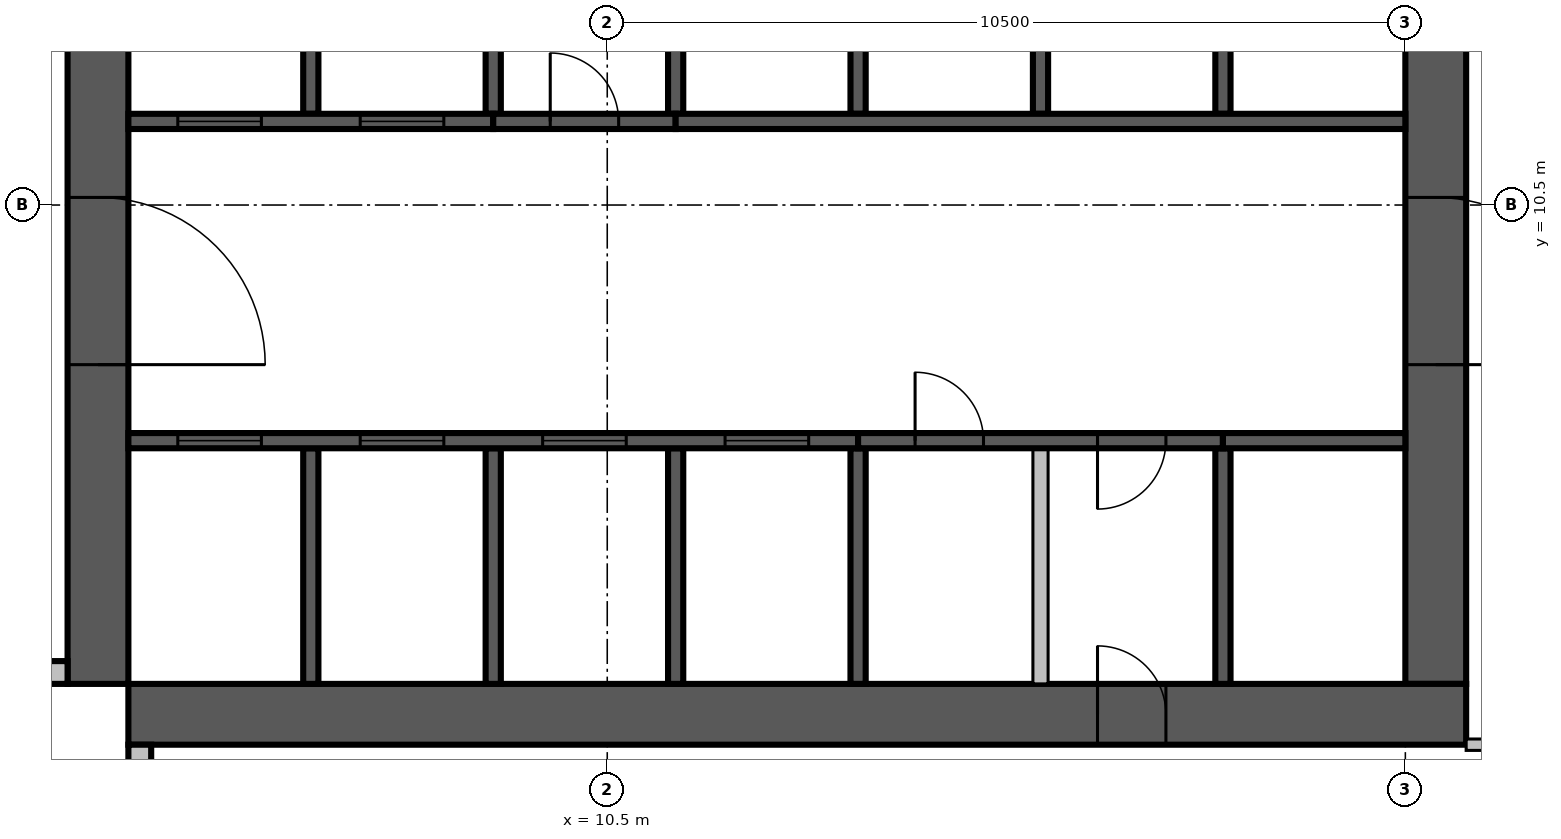
"""IFC4 building model, lengths in metres.
Left out: names, types, materials, properties, quantities, classifications, styles, units other than length and angle.
Written with IfcOpenShell. Run it as: python <this file> out.ifc"""

import sys

from ifc_helpers import new_model, si_unit, direction, frame, frame_2d, origin, place, context, subcontext, project, spatial, rectangle, extrude, source, transform, mapped, element, fill, save


model = new_model("IFC4")
c1 = context("Model", 3, precision=1e-05, world=origin(), true_north=direction((0.0, 1.0)))
c2 = subcontext(c1, "Body", "Model", "MODEL_VIEW")
j1 = project(units=[si_unit("LENGTHUNIT", "METRE"), si_unit("PLANEANGLEUNIT", "RADIAN")], contexts=[c1])
p1 = place(None, origin())
s1 = spatial("IfcSite", under=j1, at=p1, CompositionType="ELEMENT")
p2 = place(p1, origin())
s2 = spatial("IfcBuilding", under=s1, at=p2, CompositionType="ELEMENT")
p3 = place(p2, frame((0.0, 0.0, 265.2)))
s3 = spatial("IfcBuildingStorey", under=s2, at=p3, CompositionType="ELEMENT", Elevation=265.2)
m1 = source(origin(), c2, "Body", "SweptSolid", [
    extrude(rectangle(XDim=17.6, YDim=0.8, at=frame_2d((8.8, 0.0))), origin(), (0.0, 0.0, 1.0), 3.8),
])
p4 = place(p3, frame((3.8, 4.2, 0.0), z_axis=(0.0, 0.0, 1.0), x_axis=(0.0, 1.0, 0.0)))
e1 = element("IfcWall", 1, at=p4, inside=s3, PredefinedType="SHEAR", context=c2, shape_type="MappedRepresentation", body=[
    mapped(m1, transform((0.0, 0.0, 0.0), scale=1.0)),
])
m2 = source(origin(), c2, "Body", "SweptSolid", [
    extrude(rectangle(XDim=2.2, YDim=2.1, at=frame_2d((1.1, 1.05))), frame((0.0, 0.41, 0.0), z_axis=(0.0, -1.0, 0.0), x_axis=(1.0, 0.0, 0.0)), (0.0, 0.0, 1.0), 0.82),
])
p5 = place(p4, frame((4.2, 0.0, 0.0)))
e2 = element("IfcOpeningElement", 2, at=p5, cuts=e1, PredefinedType="OPENING", context=c2, shape_type="MappedRepresentation", body=[
    mapped(m2, transform((0.0, 0.0, 0.0), scale=1.0)),
])
m3 = source(origin(), c2, "Body", "SweptSolid", [
    extrude(rectangle(XDim=0.9, YDim=2.1, at=frame_2d((0.45, 1.05))), frame((0.0, 0.41, 0.0), z_axis=(0.0, -1.0, 0.0), x_axis=(1.0, 0.0, 0.0)), (0.0, 0.0, 1.0), 0.82),
])
p6 = place(p4, frame((10.95, 0.0, 0.0)))
e3 = element("IfcOpeningElement", 3, at=p6, cuts=e1, PredefinedType="OPENING", context=c2, shape_type="MappedRepresentation", body=[
    mapped(m3, transform((0.0, 0.0, 0.0), scale=1.0)),
])
m4 = source(origin(), c2, "Body", "SweptSolid", [
    extrude(rectangle(XDim=16.8, YDim=0.8, at=frame_2d((8.4, 0.0))), origin(), (0.0, 0.0, 1.0), 3.8),
])
p7 = place(p3, frame((21.4, 4.2, 0.0), z_axis=(0.0, 0.0, 1.0), x_axis=(0.0, 1.0, 0.0)))
e4 = element("IfcWall", 4, at=p7, inside=s3, PredefinedType="SHEAR", context=c2, shape_type="MappedRepresentation", body=[
    mapped(m4, transform((0.0, 0.0, 0.0), scale=1.0)),
])
p8 = place(p7, frame((4.2, 0.0, 0.0)))
e5 = element("IfcOpeningElement", 5, at=p8, cuts=e4, PredefinedType="OPENING", context=c2, shape_type="MappedRepresentation", body=[
    mapped(m2, transform((0.0, 0.0, 0.0), scale=1.0)),
])
m5 = source(origin(), c2, "Body", "SweptSolid", [
    extrude(rectangle(XDim=1.2, YDim=2.1, at=frame_2d((0.6, 1.05))), frame((0.0, 0.41, 0.0), z_axis=(0.0, -1.0, 0.0), x_axis=(1.0, 0.0, 0.0)), (0.0, 0.0, 1.0), 0.82),
])
p9 = place(p7, frame((14.7, 0.0, 0.0)))
e6 = element("IfcOpeningElement", 6, at=p9, cuts=e4, PredefinedType="OPENING", context=c2, shape_type="MappedRepresentation", body=[
    mapped(m5, transform((0.0, 0.0, 0.0), scale=1.0)),
])
p10 = place(p3, frame((4.2, 3.8, 0.0), z_axis=(0.0, 0.0, 1.0), x_axis=(1.0, 0.0, 0.0)))
e7 = element("IfcWall", 7, at=p10, inside=s3, PredefinedType="SHEAR", context=c2, shape_type="MappedRepresentation", body=[
    mapped(m1, transform((0.0, 0.0, 0.0), scale=1.0)),
])
p11 = place(p10, frame((12.75, 0.0, 0.0)))
e8 = element("IfcOpeningElement", 8, at=p11, cuts=e7, PredefinedType="OPENING", context=c2, shape_type="MappedRepresentation", body=[
    mapped(m3, transform((0.0, 0.0, 0.0), scale=1.0)),
])
m6 = source(origin(), c2, "Body", "SweptSolid", [
    extrude(rectangle(XDim=3.4, YDim=0.3, at=frame_2d((1.7, 0.0))), origin(), (0.0, 0.0, 1.0), 3.4),
])
p12 = place(p3, frame((0.0, 4.35, 0.0), z_axis=(0.0, 0.0, 1.0), x_axis=(1.0, 0.0, 0.0)))
e9 = element("IfcWall", 9, at=p12, inside=s3, PredefinedType="STANDARD", context=c2, shape_type="MappedRepresentation", body=[
    mapped(m6, transform((0.0, 0.0, 0.0), scale=1.0)),
])
m7 = source(origin(), c2, "Body", "SweptSolid", [
    extrude(rectangle(XDim=1.8, YDim=2.3, at=frame_2d((0.9, 1.15))), frame((0.0, 0.16, 0.0), z_axis=(0.0, -1.0, 0.0), x_axis=(1.0, 0.0, 0.0)), (0.0, 0.0, 1.0), 0.32),
])
p13 = place(p12, frame((1.2, 0.0, 0.6)))
e10 = element("IfcOpeningElement", 10, at=p13, cuts=e9, PredefinedType="OPENING", context=c2, shape_type="MappedRepresentation", body=[
    mapped(m7, transform((0.0, 0.0, 0.0), scale=1.0)),
])
p14 = place(p3, frame((4.35, 3.4, 0.0), z_axis=(0.0, 0.0, 1.0), x_axis=(0.0, -1.0, 0.0)))
e11 = element("IfcWall", 11, at=p14, inside=s3, PredefinedType="STANDARD", context=c2, shape_type="MappedRepresentation", body=[
    mapped(m6, transform((0.0, 0.0, 0.0), scale=1.0)),
])
p15 = place(p14, frame((0.4, 0.0, 0.6)))
e12 = element("IfcOpeningElement", 12, at=p15, cuts=e11, PredefinedType="OPENING", context=c2, shape_type="MappedRepresentation", body=[
    mapped(m7, transform((0.0, 0.0, 0.0), scale=1.0)),
])
m8 = source(origin(), c2, "Body", "SweptSolid", [
    extrude(rectangle(XDim=3.1, YDim=0.2, at=frame_2d((1.55, 0.0))), origin(), (0.0, 0.0, 1.0), 3.8),
])
for number, where, z_axis, x_axis in (
    (13, (6.6, 4.2, 0.0), (0.0, 0.0, 1.0), (0.0, 1.0, 0.0)),
    (14, (9.0, 4.2, 0.0), (0.0, 0.0, 1.0), (0.0, 1.0, 0.0)),
    (15, (11.4, 4.2, 0.0), (0.0, 0.0, 1.0), (0.0, 1.0, 0.0)),
):
    element("IfcWall", number, at=place(p3, frame(where, z_axis=z_axis, x_axis=x_axis)), inside=s3, PredefinedType="SOLIDWALL", context=c2, shape_type="MappedRepresentation", body=[
        mapped(m8, transform((0.0, 0.0, 0.0), scale=1.0)),
    ])
m9 = source(origin(), c2, "Body", "SweptSolid", [
    extrude(rectangle(XDim=3.1, YDim=0.2, at=frame_2d((1.55, 0.0))), origin(), (0.0, 0.0, 1.0), 3.4),
])
for number, where, z_axis, x_axis in (
    (16, (13.8, 4.2, 0.0), (0.0, 0.0, 1.0), (0.0, 1.0, 0.0)),
    (17, (18.6, 4.2, 0.0), (0.0, 0.0, 1.0), (0.0, 1.0, 0.0)),
):
    element("IfcWall", number, at=place(p3, frame(where, z_axis=z_axis, x_axis=x_axis)), inside=s3, PredefinedType="SOLIDWALL", context=c2, shape_type="MappedRepresentation", body=[
        mapped(m9, transform((0.0, 0.0, 0.0), scale=1.0)),
    ])
m10 = source(origin(), c2, "Body", "SweptSolid", [
    extrude(rectangle(XDim=3.1, YDim=0.2, at=frame_2d((1.55, 0.0))), origin(), (0.0, 0.0, 1.0), 3.4),
])
p16 = place(p3, frame((16.2, 4.2, 0.0), z_axis=(0.0, 0.0, 1.0), x_axis=(0.0, 1.0, 0.0)))
e18 = element("IfcWall", 18, at=p16, inside=s3, PredefinedType="PARTITIONING", context=c2, shape_type="MappedRepresentation", body=[
    mapped(m10, transform((0.0, 0.0, 0.0), scale=1.0)),
])
m11 = source(origin(), c2, "Body", "SweptSolid", [
    extrude(rectangle(XDim=3.0, YDim=0.2, at=frame_2d((1.5, 0.0))), origin(), (0.0, 0.0, 1.0), 3.8),
])
p17 = place(p3, frame((6.6, 11.7, 0.0), z_axis=(0.0, 0.0, 1.0), x_axis=(0.0, 1.0, 0.0)))
e19 = element("IfcWall", 19, at=p17, inside=s3, PredefinedType="SOLIDWALL", context=c2, shape_type="MappedRepresentation", body=[
    mapped(m11, transform((0.0, 0.0, 0.0), scale=1.0)),
])
m12 = source(origin(), c2, "Body", "SweptSolid", [
    extrude(rectangle(XDim=3.0, YDim=0.2, at=frame_2d((1.5, 0.0))), origin(), (0.0, 0.0, 1.0), 3.4),
])
for number, where, z_axis, x_axis in (
    (20, (9.0, 11.7, 0.0), (0.0, 0.0, 1.0), (0.0, 1.0, 0.0)),
    (21, (11.4, 11.7, 0.0), (0.0, 0.0, 1.0), (0.0, 1.0, 0.0)),
):
    element("IfcWall", number, at=place(p3, frame(where, z_axis=z_axis, x_axis=x_axis)), inside=s3, PredefinedType="SOLIDWALL", context=c2, shape_type="MappedRepresentation", body=[
        mapped(m12, transform((0.0, 0.0, 0.0), scale=1.0)),
    ])
for number, where, z_axis, x_axis in (
    (22, (13.8, 11.7, 0.0), (0.0, 0.0, 1.0), (0.0, 1.0, 0.0)),
    (23, (16.2, 11.7, 0.0), (0.0, 0.0, 1.0), (0.0, 1.0, 0.0)),
    (24, (18.6, 11.7, 0.0), (0.0, 0.0, 1.0), (0.0, 1.0, 0.0)),
):
    element("IfcWall", number, at=place(p3, frame(where, z_axis=z_axis, x_axis=x_axis)), inside=s3, PredefinedType="SOLIDWALL", context=c2, shape_type="MappedRepresentation", body=[
        mapped(m11, transform((0.0, 0.0, 0.0), scale=1.0)),
    ])
m13 = source(origin(), c2, "Body", "SweptSolid", [
    extrude(rectangle(XDim=9.6, YDim=0.2, at=frame_2d((4.8, 0.0))), origin(), (0.0, 0.0, 1.0), 3.8),
])
p18 = place(p3, frame((4.2, 7.4, 0.0), z_axis=(0.0, 0.0, 1.0), x_axis=(1.0, 0.0, 0.0)))
e25 = element("IfcWall", 25, at=p18, inside=s3, PredefinedType="SOLIDWALL", context=c2, shape_type="MappedRepresentation", body=[
    mapped(m13, transform((0.0, 0.0, 0.0), scale=1.0)),
])
m14 = source(origin(), c2, "Body", "SweptSolid", [
    extrude(rectangle(XDim=1.1, YDim=2.1, at=frame_2d((0.55, 1.05))), frame((0.0, 0.11, 0.0), z_axis=(0.0, -1.0, 0.0), x_axis=(1.0, 0.0, 0.0)), (0.0, 0.0, 1.0), 0.22),
])
p19 = place(p18, frame((0.65, 0.0, 0.0)))
e26 = element("IfcOpeningElement", 26, at=p19, cuts=e25, PredefinedType="OPENING", context=c2, shape_type="MappedRepresentation", body=[
    mapped(m14, transform((0.0, 0.0, 0.0), scale=1.0)),
])
p20 = place(p18, frame((3.05, 0.0, 0.0)))
e27 = element("IfcOpeningElement", 27, at=p20, cuts=e25, PredefinedType="OPENING", context=c2, shape_type="MappedRepresentation", body=[
    mapped(m14, transform((0.0, 0.0, 0.0), scale=1.0)),
])
p21 = place(p18, frame((5.45, 0.0, 0.0)))
e28 = element("IfcOpeningElement", 28, at=p21, cuts=e25, PredefinedType="OPENING", context=c2, shape_type="MappedRepresentation", body=[
    mapped(m14, transform((0.0, 0.0, 0.0), scale=1.0)),
])
p22 = place(p18, frame((7.85, 0.0, 0.0)))
e29 = element("IfcOpeningElement", 29, at=p22, cuts=e25, PredefinedType="OPENING", context=c2, shape_type="MappedRepresentation", body=[
    mapped(m14, transform((0.0, 0.0, 0.0), scale=1.0)),
])
m15 = source(origin(), c2, "Body", "SweptSolid", [
    extrude(rectangle(XDim=4.8, YDim=0.2, at=frame_2d((2.4, 0.0))), origin(), (0.0, 0.0, 1.0), 3.4),
])
p23 = place(p3, frame((13.8, 7.4, 0.0), z_axis=(0.0, 0.0, 1.0), x_axis=(1.0, 0.0, 0.0)))
e30 = element("IfcWall", 30, at=p23, inside=s3, PredefinedType="SOLIDWALL", context=c2, shape_type="MappedRepresentation", body=[
    mapped(m15, transform((0.0, 0.0, 0.0), scale=1.0)),
])
m16 = source(origin(), c2, "Body", "SweptSolid", [
    extrude(rectangle(XDim=0.9, YDim=2.1, at=frame_2d((0.45, 1.05))), frame((0.0, 0.11, 0.0), z_axis=(0.0, -1.0, 0.0), x_axis=(1.0, 0.0, 0.0)), (0.0, 0.0, 1.0), 0.22),
])
p24 = place(p23, frame((0.75, 0.0, 0.0)))
e31 = element("IfcOpeningElement", 31, at=p24, cuts=e30, PredefinedType="OPENING", context=c2, shape_type="MappedRepresentation", body=[
    mapped(m16, transform((0.0, 0.0, 0.0), scale=1.0)),
])
p25 = place(p23, frame((3.15, 0.0, 0.0)))
e32 = element("IfcOpeningElement", 32, at=p25, cuts=e30, PredefinedType="OPENING", context=c2, shape_type="MappedRepresentation", body=[
    mapped(m16, transform((0.0, 0.0, 0.0), scale=1.0)),
])
m17 = source(origin(), c2, "Body", "SweptSolid", [
    extrude(rectangle(XDim=2.4, YDim=0.2, at=frame_2d((1.2, 0.0))), origin(), (0.0, 0.0, 1.0), 3.8),
])
p26 = place(p3, frame((18.6, 7.4, 0.0), z_axis=(0.0, 0.0, 1.0), x_axis=(1.0, 0.0, 0.0)))
e33 = element("IfcWall", 33, at=p26, inside=s3, PredefinedType="SOLIDWALL", context=c2, shape_type="MappedRepresentation", body=[
    mapped(m17, transform((0.0, 0.0, 0.0), scale=1.0)),
])
m18 = source(origin(), c2, "Body", "SweptSolid", [
    extrude(rectangle(XDim=4.8, YDim=0.2, at=frame_2d((2.4, 0.0))), origin(), (0.0, 0.0, 1.0), 3.8),
])
p27 = place(p3, frame((4.2, 11.6, 0.0), z_axis=(0.0, 0.0, 1.0), x_axis=(1.0, 0.0, 0.0)))
e34 = element("IfcWall", 34, at=p27, inside=s3, PredefinedType="SOLIDWALL", context=c2, shape_type="MappedRepresentation", body=[
    mapped(m18, transform((0.0, 0.0, 0.0), scale=1.0)),
])
p28 = place(p27, frame((0.65, 0.0, 0.0)))
e35 = element("IfcOpeningElement", 35, at=p28, cuts=e34, PredefinedType="OPENING", context=c2, shape_type="MappedRepresentation", body=[
    mapped(m14, transform((0.0, 0.0, 0.0), scale=1.0)),
])
p29 = place(p27, frame((3.05, 0.0, 0.0)))
e36 = element("IfcOpeningElement", 36, at=p29, cuts=e34, PredefinedType="OPENING", context=c2, shape_type="MappedRepresentation", body=[
    mapped(m14, transform((0.0, 0.0, 0.0), scale=1.0)),
])
m19 = source(origin(), c2, "Body", "SweptSolid", [
    extrude(rectangle(XDim=2.4, YDim=0.2, at=frame_2d((1.2, 0.0))), origin(), (0.0, 0.0, 1.0), 3.4),
])
p30 = place(p3, frame((9.0, 11.6, 0.0), z_axis=(0.0, 0.0, 1.0), x_axis=(1.0, 0.0, 0.0)))
e37 = element("IfcWall", 37, at=p30, inside=s3, PredefinedType="SOLIDWALL", context=c2, shape_type="MappedRepresentation", body=[
    mapped(m19, transform((0.0, 0.0, 0.0), scale=1.0)),
])
p31 = place(p30, frame((0.75, 0.0, 0.0)))
e38 = element("IfcOpeningElement", 38, at=p31, cuts=e37, PredefinedType="OPENING", context=c2, shape_type="MappedRepresentation", body=[
    mapped(m16, transform((0.0, 0.0, 0.0), scale=1.0)),
])
p32 = place(p3, frame((11.4, 11.6, 0.0), z_axis=(0.0, 0.0, 1.0), x_axis=(1.0, 0.0, 0.0)))
e39 = element("IfcWall", 39, at=p32, inside=s3, PredefinedType="SOLIDWALL", context=c2, shape_type="MappedRepresentation", body=[
    mapped(m13, transform((0.0, 0.0, 0.0), scale=1.0)),
])
m20 = source(origin(), c2, "Body", "SweptSolid", [
    extrude(rectangle(XDim=7.525, YDim=0.15, at=frame_2d((3.763, 0.0))), origin(), (0.0, 0.0, 1.0), 3.4),
])
p33 = place(p3, frame((21.8, 3.4, 0.0), z_axis=(0.0, 0.0, 1.0), x_axis=(1.0, 0.0, 0.0)))
e40 = element("IfcWall", 40, at=p33, inside=s3, PredefinedType="PARTITIONING", context=c2, shape_type="MappedRepresentation", body=[
    mapped(m20, transform((0.0, 0.0, 0.0), scale=1.0)),
])
m21 = source(origin(), c2, "Body", "SweptSolid", [
    extrude(rectangle(XDim=1.0, YDim=2.1, at=frame_2d((0.5, 1.05))), frame((0.0, 0.085, 0.0), z_axis=(0.0, -1.0, 0.0), x_axis=(1.0, 0.0, 0.0)), (0.0, 0.0, 1.0), 0.17),
])
p34 = place(p33, frame((3.0, 0.0, 0.0)))
e41 = element("IfcOpeningElement", 41, at=p34, cuts=e40, PredefinedType="OPENING", context=c2, shape_type="MappedRepresentation", body=[
    mapped(m21, transform((0.0, 0.0, 0.0), scale=1.0)),
])
m22 = source(origin(), c2, "Body", "SweptSolid", [
    extrude(rectangle(XDim=0.9, YDim=2.1, at=frame_2d((0.45, 1.05))), frame((0.0, 0.085, 0.0), z_axis=(0.0, -1.0, 0.0), x_axis=(1.0, 0.0, 0.0)), (0.0, 0.0, 1.0), 0.17),
])
p35 = place(p33, frame((4.413, 0.0, 0.0)))
e42 = element("IfcOpeningElement", 42, at=p35, cuts=e40, PredefinedType="OPENING", context=c2, shape_type="MappedRepresentation", body=[
    mapped(m22, transform((0.0, 0.0, 0.0), scale=1.0)),
])
m23 = source(origin(), c2, "Body", "SweptSolid", [
    extrude(rectangle(XDim=1.1, YDim=2.1, at=frame_2d((0.55, 1.05))), frame((0.0, 0.025, 0.0), z_axis=(0.0, -1.0, 0.0), x_axis=(1.0, 0.0, 0.0)), (0.0, 0.0, 1.0), 0.05),
])
p36 = place(p19, origin())
e43 = element("IfcDoor", 43, at=p36, inside=s3, OperationType="SLIDING_TO_LEFT", PredefinedType="DOOR", context=c2, shape_type="MappedRepresentation", body=[
    mapped(m23, transform((0.0, 0.0, 0.0), scale=1.0)),
])
fill(e26, e43)
p37 = place(p20, origin())
e44 = element("IfcDoor", 44, at=p37, inside=s3, OperationType="SLIDING_TO_LEFT", PredefinedType="DOOR", context=c2, shape_type="MappedRepresentation", body=[
    mapped(m23, transform((0.0, 0.0, 0.0), scale=1.0)),
])
fill(e27, e44)
p38 = place(p21, origin())
e45 = element("IfcDoor", 45, at=p38, inside=s3, OperationType="SLIDING_TO_LEFT", PredefinedType="DOOR", context=c2, shape_type="MappedRepresentation", body=[
    mapped(m23, transform((0.0, 0.0, 0.0), scale=1.0)),
])
fill(e28, e45)
p39 = place(p22, origin())
e46 = element("IfcDoor", 46, at=p39, inside=s3, OperationType="SLIDING_TO_LEFT", PredefinedType="DOOR", context=c2, shape_type="MappedRepresentation", body=[
    mapped(m23, transform((0.0, 0.0, 0.0), scale=1.0)),
])
fill(e29, e46)
m24 = source(origin(), c2, "Body", "SweptSolid", [
    extrude(rectangle(XDim=0.9, YDim=2.1, at=frame_2d((0.45, 1.05))), frame((0.0, 0.025, 0.0), z_axis=(0.0, -1.0, 0.0), x_axis=(1.0, 0.0, 0.0)), (0.0, 0.0, 1.0), 0.05),
])
p40 = place(p24, origin())
e47 = element("IfcDoor", 47, at=p40, inside=s3, OperationType="SINGLE_SWING_LEFT", PredefinedType="DOOR", context=c2, shape_type="MappedRepresentation", body=[
    mapped(m24, transform((0.0, 0.0, 0.0), scale=1.0)),
])
fill(e31, e47)
p41 = place(p25, origin())
e48 = element("IfcDoor", 48, at=p41, inside=s3, OperationType="SINGLE_SWING_RIGHT", PredefinedType="DOOR", context=c2, shape_type="MappedRepresentation", body=[
    mapped(m24, transform((0.0, 0.0, 0.0), scale=1.0)),
])
fill(e32, e48)
p42 = place(p28, origin())
e49 = element("IfcDoor", 49, at=p42, inside=s3, OperationType="SLIDING_TO_LEFT", PredefinedType="DOOR", context=c2, shape_type="MappedRepresentation", body=[
    mapped(m23, transform((0.0, 0.0, 0.0), scale=1.0)),
])
fill(e35, e49)
p43 = place(p29, origin())
e50 = element("IfcDoor", 50, at=p43, inside=s3, OperationType="SLIDING_TO_LEFT", PredefinedType="DOOR", context=c2, shape_type="MappedRepresentation", body=[
    mapped(m23, transform((0.0, 0.0, 0.0), scale=1.0)),
])
fill(e36, e50)
p44 = place(p31, origin())
e51 = element("IfcDoor", 51, at=p44, inside=s3, OperationType="SINGLE_SWING_LEFT", PredefinedType="DOOR", context=c2, shape_type="MappedRepresentation", body=[
    mapped(m24, transform((0.0, 0.0, 0.0), scale=1.0)),
])
fill(e38, e51)
m25 = source(origin(), c2, "Body", "SweptSolid", [
    extrude(rectangle(XDim=2.2, YDim=2.1, at=frame_2d((1.1, 1.05))), frame((0.0, 0.025, 0.0), z_axis=(0.0, -1.0, 0.0), x_axis=(1.0, 0.0, 0.0)), (0.0, 0.0, 1.0), 0.05),
])
p45 = place(p8, origin())
e52 = element("IfcDoor", 52, at=p45, inside=s3, OperationType="DOUBLE_DOOR_SINGLE_SWING", PredefinedType="DOOR", context=c2, shape_type="MappedRepresentation", body=[
    mapped(m25, transform((0.0, 0.0, 0.0), scale=1.0)),
])
fill(e5, e52)
p46 = place(p5, origin())
e53 = element("IfcDoor", 53, at=p46, inside=s3, OperationType="DOUBLE_DOOR_SINGLE_SWING", PredefinedType="DOOR", context=c2, shape_type="MappedRepresentation", body=[
    mapped(m25, transform((0.0, 0.0, 0.0), scale=1.0)),
])
fill(e2, e53)
p47 = place(p11, origin())
e54 = element("IfcDoor", 54, at=p47, inside=s3, OperationType="SINGLE_SWING_LEFT", PredefinedType="DOOR", context=c2, shape_type="MappedRepresentation", body=[
    mapped(m24, transform((0.0, 0.0, 0.0), scale=1.0)),
])
fill(e8, e54)
save(model, sys.argv[1])
